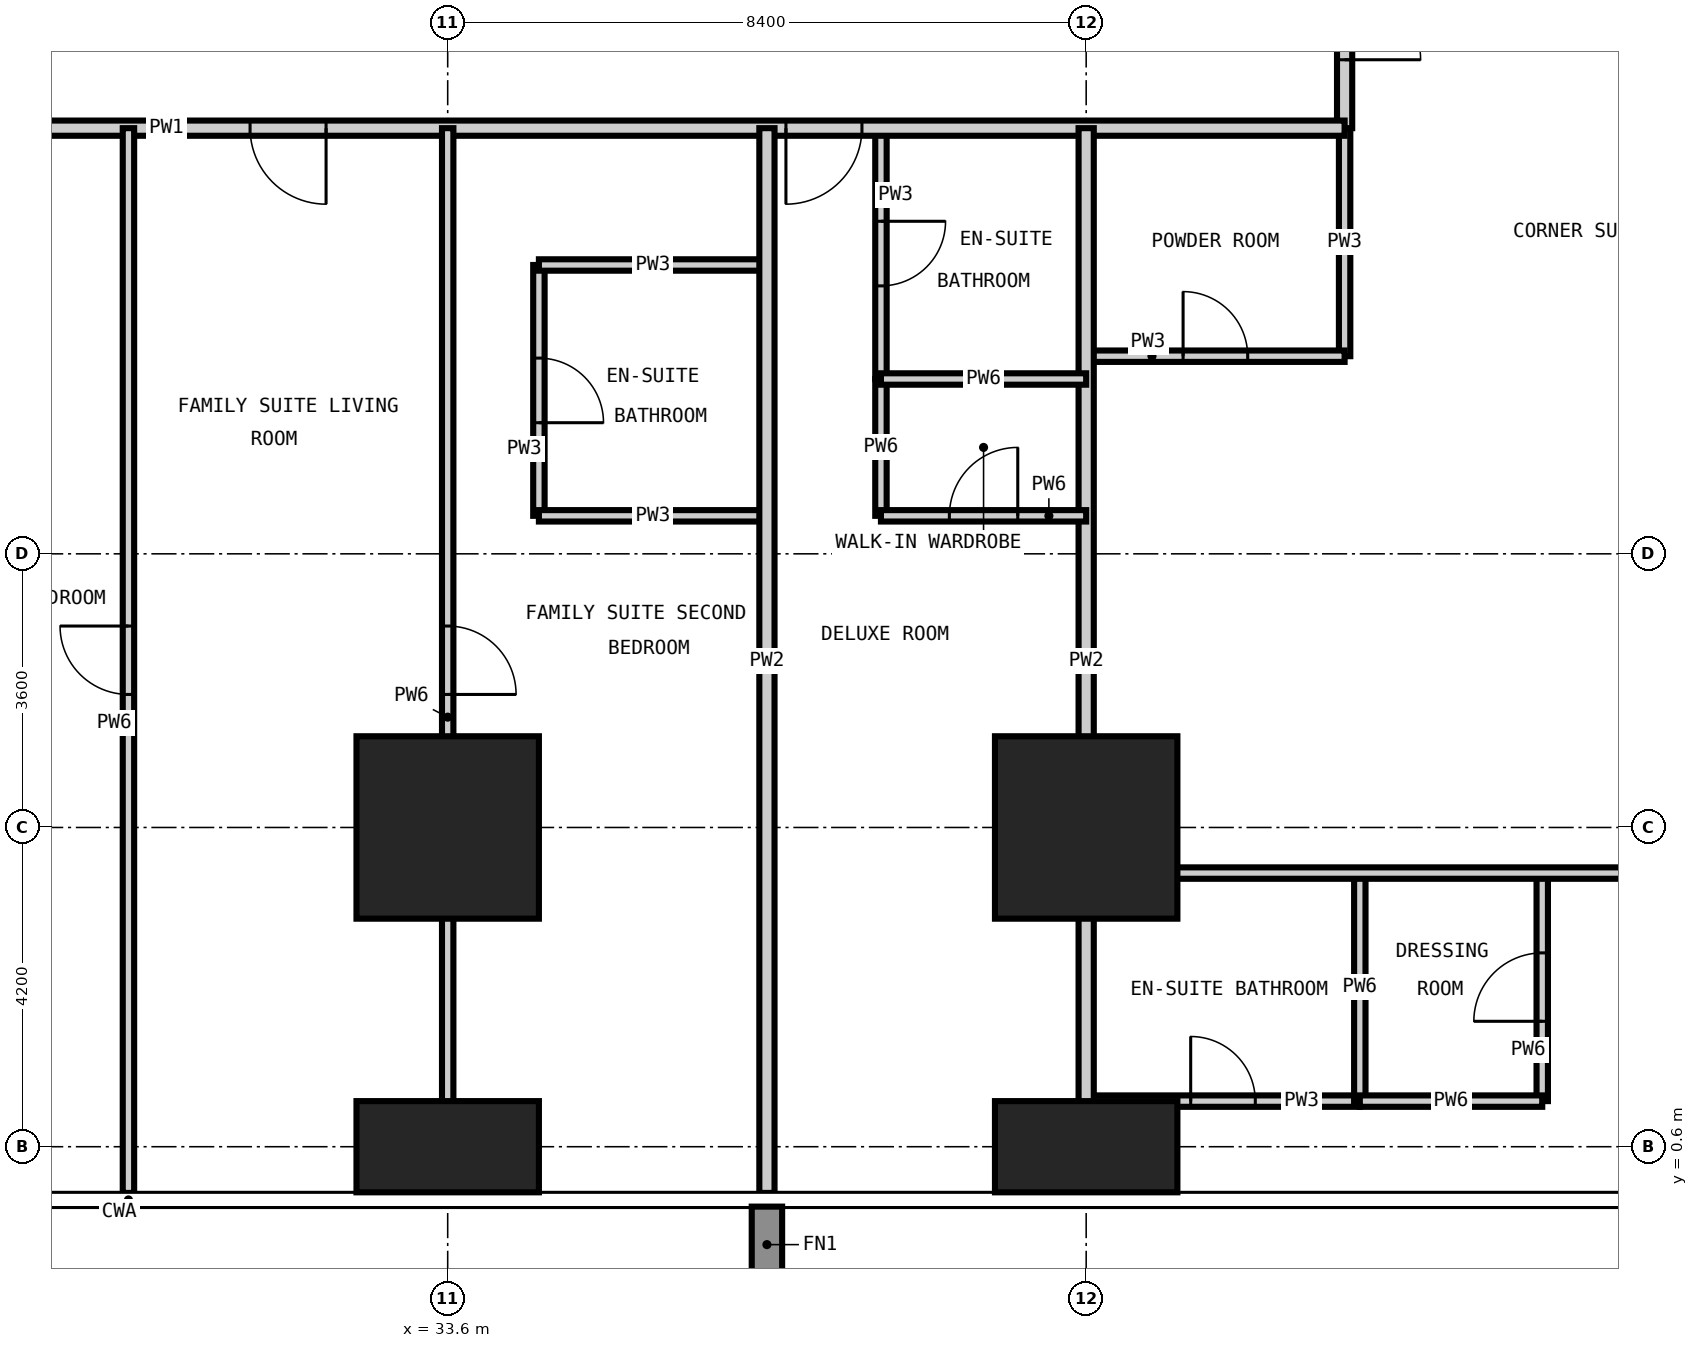
"""IFC4 building model, lengths in metres.
Left out: names, types, materials, properties, quantities, classifications, styles, units other than length and angle.
Written with IfcOpenShell. Run it as: python <this file> out.ifc"""

import sys

from ifc_helpers import new_model, si_unit, direction, frame, frame_2d, origin, origin_2d, place, context, subcontext, project, spatial, rectangle, extrude, element, fill, save


model = new_model("IFC4")
c1 = context("Model", 3, precision=1e-05, world=origin(), true_north=direction((0.0, 1.0)))
c2 = subcontext(c1, "Body", "Model", "MODEL_VIEW")
j1 = project(units=[si_unit("LENGTHUNIT", "METRE"), si_unit("PLANEANGLEUNIT", "RADIAN")], contexts=[c1])
p1 = place(None, origin())
s1 = spatial("IfcSite", under=j1, at=p1, CompositionType="ELEMENT")
p2 = place(p1, origin())
s2 = spatial("IfcBuilding", under=s1, at=p2, CompositionType="ELEMENT")
p3 = place(p2, frame((0.0, 0.0, 81.0)))
s3 = spatial("IfcBuildingStorey", under=s2, at=p3, CompositionType="ELEMENT", Elevation=81.0)
p4 = place(p3, frame((33.6, 0.6, -0.35), z_axis=(0.0, 0.0, 1.0), x_axis=(1.0, 0.0, 0.0)))
e1 = element("IfcColumn", 1, at=p4, inside=s3, PredefinedType="COLUMN", context=c2, shape_type="SweptSolid", body=[
    extrude(rectangle(XDim=2.4, YDim=1.2, at=origin_2d()), origin(), (0.0, 0.0, 1.0), 3.6),
])
p5 = place(p3, frame((33.6, 4.8, -0.35), z_axis=(0.0, 0.0, 1.0), x_axis=(1.0, 0.0, 0.0)))
e2 = element("IfcColumn", 2, at=p5, inside=s3, PredefinedType="COLUMN", context=c2, shape_type="SweptSolid", body=[
    extrude(rectangle(XDim=2.4, YDim=2.4, at=origin_2d()), origin(), (0.0, 0.0, 1.0), 3.6),
])
p6 = place(p3, frame((42.0, 0.6, -0.35), z_axis=(0.0, 0.0, 1.0), x_axis=(1.0, 0.0, 0.0)))
e3 = element("IfcColumn", 3, at=p6, inside=s3, PredefinedType="COLUMN", context=c2, shape_type="SweptSolid", body=[
    extrude(rectangle(XDim=2.4, YDim=1.2, at=origin_2d()), origin(), (0.0, 0.0, 1.0), 3.6),
])
p7 = place(p3, frame((42.0, 4.8, -0.35), z_axis=(0.0, 0.0, 1.0), x_axis=(1.0, 0.0, 0.0)))
e4 = element("IfcColumn", 4, at=p7, inside=s3, PredefinedType="COLUMN", context=c2, shape_type="SweptSolid", body=[
    extrude(rectangle(XDim=2.4, YDim=2.4, at=origin_2d()), origin(), (0.0, 0.0, 1.0), 3.6),
])
p8 = place(p3, frame((34.8, 8.9, 0.0), z_axis=(0.0, 0.0, 1.0), x_axis=(0.0, 1.0, 0.0)))
e5 = element("IfcWall", 5, at=p8, inside=s3, PredefinedType="PARTITIONING", context=c2, shape_type="SweptSolid", body=[
    extrude(rectangle(XDim=3.3, YDim=0.15, at=frame_2d((1.65, 0.0))), origin(), (0.0, 0.0, 1.0), 3.25),
])
p9 = place(p8, frame((1.225, 0.0, 0.0)))
e6 = element("IfcOpeningElement", 6, at=p9, cuts=e5, PredefinedType="OPENING", context=c2, shape_type="SweptSolid", body=[
    extrude(rectangle(XDim=0.85, YDim=2.1, at=frame_2d((0.425, 1.05))), frame((0.0, 0.085, 0.0), z_axis=(0.0, -1.0, 0.0), x_axis=(1.0, 0.0, 0.0)), (0.0, 0.0, 1.0), 0.17),
])
p10 = place(p3, frame((39.3, 10.7, 0.0), z_axis=(0.0, 0.0, 1.0), x_axis=(0.0, 1.0, 0.0)))
e7 = element("IfcWall", 7, at=p10, inside=s3, PredefinedType="PARTITIONING", context=c2, shape_type="SweptSolid", body=[
    extrude(rectangle(XDim=3.3, YDim=0.15, at=frame_2d((1.65, 0.0))), origin(), (0.0, 0.0, 1.0), 3.25),
])
p11 = place(p10, frame((1.225, 0.0, 0.0)))
e8 = element("IfcOpeningElement", 8, at=p11, cuts=e7, PredefinedType="OPENING", context=c2, shape_type="SweptSolid", body=[
    extrude(rectangle(XDim=0.85, YDim=2.1, at=frame_2d((0.425, 1.05))), frame((0.0, 0.085, 0.0), z_axis=(0.0, -1.0, 0.0), x_axis=(1.0, 0.0, 0.0)), (0.0, 0.0, 1.0), 0.17),
])
p12 = place(p3, frame((45.4, 11.0, 0.0), z_axis=(0.0, 0.0, 1.0), x_axis=(0.0, 1.0, 0.0)))
e9 = element("IfcWall", 9, at=p12, inside=s3, PredefinedType="PARTITIONING", context=c2, shape_type="SweptSolid", body=[
    extrude(rectangle(XDim=3.0, YDim=0.15, at=frame_2d((1.5, 0.0))), origin(), (0.0, 0.0, 1.0), 3.25),
])
p13 = place(p3, frame((42.0, 1.2, 0.0), z_axis=(0.0, 0.0, 1.0), x_axis=(1.0, 0.0, 0.0)))
e10 = element("IfcWall", 10, at=p13, inside=s3, PredefinedType="PARTITIONING", context=c2, shape_type="SweptSolid", body=[
    extrude(rectangle(XDim=3.6, YDim=0.15, at=frame_2d((1.8, 0.0))), origin(), (0.0, 0.0, 1.0), 3.25),
])
p14 = place(p13, frame((1.375, 0.0, 0.0)))
e11 = element("IfcOpeningElement", 11, at=p14, cuts=e10, PredefinedType="OPENING", context=c2, shape_type="SweptSolid", body=[
    extrude(rectangle(XDim=0.85, YDim=2.1, at=frame_2d((0.425, 1.05))), frame((0.0, 0.085, 0.0), z_axis=(0.0, -1.0, 0.0), x_axis=(1.0, 0.0, 0.0)), (0.0, 0.0, 1.0), 0.17),
])
p15 = place(p3, frame((34.8, 8.9, 0.0), z_axis=(0.0, 0.0, 1.0), x_axis=(1.0, 0.0, 0.0)))
e12 = element("IfcWall", 12, at=p15, inside=s3, PredefinedType="PARTITIONING", context=c2, shape_type="SweptSolid", body=[
    extrude(rectangle(XDim=3.0, YDim=0.15, at=frame_2d((1.5, 0.0))), origin(), (0.0, 0.0, 1.0), 3.25),
])
p16 = place(p3, frame((42.0, 11.0, 0.0), z_axis=(0.0, 0.0, 1.0), x_axis=(1.0, 0.0, 0.0)))
e13 = element("IfcWall", 13, at=p16, inside=s3, PredefinedType="PARTITIONING", context=c2, shape_type="SweptSolid", body=[
    extrude(rectangle(XDim=3.4, YDim=0.15, at=frame_2d((1.7, 0.0))), origin(), (0.0, 0.0, 1.0), 3.25),
])
p17 = place(p16, frame((1.275, 0.0, 0.0)))
e14 = element("IfcOpeningElement", 14, at=p17, cuts=e13, PredefinedType="OPENING", context=c2, shape_type="SweptSolid", body=[
    extrude(rectangle(XDim=0.85, YDim=2.1, at=frame_2d((0.425, 1.05))), frame((0.0, 0.085, 0.0), z_axis=(0.0, -1.0, 0.0), x_axis=(1.0, 0.0, 0.0)), (0.0, 0.0, 1.0), 0.17),
])
p18 = place(p3, frame((34.8, 12.2, 0.0), z_axis=(0.0, 0.0, 1.0), x_axis=(1.0, 0.0, 0.0)))
e15 = element("IfcWall", 15, at=p18, inside=s3, PredefinedType="PARTITIONING", context=c2, shape_type="SweptSolid", body=[
    extrude(rectangle(XDim=3.0, YDim=0.15, at=frame_2d((1.5, 0.0))), origin(), (0.0, 0.0, 1.0), 3.25),
])
p19 = place(p3, frame((45.4, 46.0, 0.0), z_axis=(0.0, 0.0, 1.0), x_axis=(0.0, -1.0, 0.0)))
e16 = element("IfcWall", 16, at=p19, inside=s3, PredefinedType="PARTITIONING", context=c2, shape_type="SweptSolid", body=[
    extrude(rectangle(XDim=32.0, YDim=0.2, at=frame_2d((16.0, 0.0))), origin(), (0.0, 0.0, 1.0), 3.25),
])
p20 = place(p19, frame((22.4, 0.0, 0.0)))
e17 = element("IfcOpeningElement", 17, at=p20, cuts=e16, PredefinedType="OPENING", context=c2, shape_type="SweptSolid", body=[
    extrude(rectangle(XDim=1.0, YDim=2.2, at=frame_2d((0.5, 1.1))), frame((0.0, 0.11, 0.0), z_axis=(0.0, -1.0, 0.0), x_axis=(1.0, 0.0, 0.0)), (0.0, 0.0, 1.0), 0.22),
])
p21 = place(p19, frame((9.8, 0.0, 0.0)))
e18 = element("IfcOpeningElement", 18, at=p21, cuts=e16, PredefinedType="OPENING", context=c2, shape_type="SweptSolid", body=[
    extrude(rectangle(XDim=1.0, YDim=2.2, at=frame_2d((0.5, 1.1))), frame((0.0, 0.11, 0.0), z_axis=(0.0, -1.0, 0.0), x_axis=(1.0, 0.0, 0.0)), (0.0, 0.0, 1.0), 0.22),
])
p22 = place(p19, frame((30.1, 0.0, 0.0)))
e19 = element("IfcOpeningElement", 19, at=p22, cuts=e16, PredefinedType="OPENING", context=c2, shape_type="SweptSolid", body=[
    extrude(rectangle(XDim=1.0, YDim=2.2, at=frame_2d((0.5, 1.1))), frame((0.0, 0.11, 0.0), z_axis=(0.0, -1.0, 0.0), x_axis=(1.0, 0.0, 0.0)), (0.0, 0.0, 1.0), 0.22),
])
p23 = place(p19, frame((1.5, 0.0, 0.0)))
e20 = element("IfcOpeningElement", 20, at=p23, cuts=e16, PredefinedType="OPENING", context=c2, shape_type="SweptSolid", body=[
    extrude(rectangle(XDim=1.0, YDim=2.2, at=frame_2d((0.5, 1.1))), frame((0.0, 0.11, 0.0), z_axis=(0.0, -1.0, 0.0), x_axis=(1.0, 0.0, 0.0)), (0.0, 0.0, 1.0), 0.22),
])
p24 = place(p3, frame((45.4, 14.0, 0.0), z_axis=(0.0, 0.0, 1.0), x_axis=(-1.0, 0.0, 0.0)))
e21 = element("IfcWall", 21, at=p24, inside=s3, PredefinedType="PARTITIONING", context=c2, shape_type="SweptSolid", body=[
    extrude(rectangle(XDim=31.4, YDim=0.2, at=frame_2d((15.7, 0.0))), origin(), (0.0, 0.0, 1.0), 3.25),
])
p25 = place(p24, frame((24.65, 0.0, 0.0)))
e22 = element("IfcOpeningElement", 22, at=p25, cuts=e21, PredefinedType="OPENING", context=c2, shape_type="SweptSolid", body=[
    extrude(rectangle(XDim=1.0, YDim=2.2, at=frame_2d((0.5, 1.1))), frame((0.0, 0.11, 0.0), z_axis=(0.0, -1.0, 0.0), x_axis=(1.0, 0.0, 0.0)), (0.0, 0.0, 1.0), 0.22),
])
p26 = place(p24, frame((23.15, 0.0, 0.0)))
e23 = element("IfcOpeningElement", 23, at=p26, cuts=e21, PredefinedType="OPENING", context=c2, shape_type="SweptSolid", body=[
    extrude(rectangle(XDim=1.0, YDim=2.2, at=frame_2d((0.5, 1.1))), frame((0.0, 0.11, 0.0), z_axis=(0.0, -1.0, 0.0), x_axis=(1.0, 0.0, 0.0)), (0.0, 0.0, 1.0), 0.22),
])
p27 = place(p24, frame((13.4, 0.0, 0.0)))
e24 = element("IfcOpeningElement", 24, at=p27, cuts=e21, PredefinedType="OPENING", context=c2, shape_type="SweptSolid", body=[
    extrude(rectangle(XDim=1.0, YDim=2.2, at=frame_2d((0.5, 1.1))), frame((0.0, 0.11, 0.0), z_axis=(0.0, -1.0, 0.0), x_axis=(1.0, 0.0, 0.0)), (0.0, 0.0, 1.0), 0.22),
])
p28 = place(p24, frame((6.35, 0.0, 0.0)))
e25 = element("IfcOpeningElement", 25, at=p28, cuts=e21, PredefinedType="OPENING", context=c2, shape_type="SweptSolid", body=[
    extrude(rectangle(XDim=1.0, YDim=2.2, at=frame_2d((0.5, 1.1))), frame((0.0, 0.11, 0.0), z_axis=(0.0, -1.0, 0.0), x_axis=(1.0, 0.0, 0.0)), (0.0, 0.0, 1.0), 0.22),
])
for number, where, z_axis, x_axis in (
    (26, (37.8, -0.008, 0.0), (0.0, 0.0, 1.0), (0.0, 1.0, 0.0)),
    (27, (42.0, -0.008, 0.0), (0.0, 0.0, 1.0), (0.0, 1.0, 0.0)),
):
    element("IfcWall", number, at=place(p3, frame(where, z_axis=z_axis, x_axis=x_axis)), inside=s3, PredefinedType="PARTITIONING", context=c2, shape_type="SweptSolid", body=[
        extrude(rectangle(XDim=14.008, YDim=0.2, at=frame_2d((7.004, 0.0))), origin(), (0.0, 0.0, 1.0), 3.25),
    ])
p29 = place(p3, frame((29.4, -0.008, 0.0), z_axis=(0.0, 0.0, 1.0), x_axis=(0.0, 1.0, 0.0)))
e28 = element("IfcWall", 28, at=p29, inside=s3, PredefinedType="PARTITIONING", context=c2, shape_type="SweptSolid", body=[
    extrude(rectangle(XDim=14.008, YDim=0.15, at=frame_2d((7.004, 0.0))), origin(), (0.0, 0.0, 1.0), 3.25),
])
p30 = place(p29, frame((6.558, 0.0, 0.0)))
e29 = element("IfcOpeningElement", 29, at=p30, cuts=e28, PredefinedType="OPENING", context=c2, shape_type="SweptSolid", body=[
    extrude(rectangle(XDim=0.9, YDim=2.1, at=frame_2d((0.45, 1.05))), frame((0.0, 0.085, 0.0), z_axis=(0.0, -1.0, 0.0), x_axis=(1.0, 0.0, 0.0)), (0.0, 0.0, 1.0), 0.17),
])
p31 = place(p3, frame((33.6, -0.008, 0.0), z_axis=(0.0, 0.0, 1.0), x_axis=(0.0, 1.0, 0.0)))
e30 = element("IfcWall", 30, at=p31, inside=s3, PredefinedType="PARTITIONING", context=c2, shape_type="SweptSolid", body=[
    extrude(rectangle(XDim=14.008, YDim=0.15, at=frame_2d((7.004, 0.0))), origin(), (0.0, 0.0, 1.0), 3.25),
])
p32 = place(p31, frame((6.558, 0.0, 0.0)))
e31 = element("IfcOpeningElement", 31, at=p32, cuts=e30, PredefinedType="OPENING", context=c2, shape_type="SweptSolid", body=[
    extrude(rectangle(XDim=0.9, YDim=2.1, at=frame_2d((0.45, 1.05))), frame((0.0, 0.085, 0.0), z_axis=(0.0, -1.0, 0.0), x_axis=(1.0, 0.0, 0.0)), (0.0, 0.0, 1.0), 0.17),
])
p33 = place(p3, frame((39.3, 8.9, 0.0), z_axis=(0.0, 0.0, 1.0), x_axis=(0.0, 1.0, 0.0)))
e32 = element("IfcWall", 32, at=p33, inside=s3, PredefinedType="PARTITIONING", context=c2, shape_type="SweptSolid", body=[
    extrude(rectangle(XDim=1.8, YDim=0.15, at=frame_2d((0.9, 0.0))), origin(), (0.0, 0.0, 1.0), 3.25),
])
p34 = place(p3, frame((45.6, 1.2, 0.0), z_axis=(0.0, 0.0, 1.0), x_axis=(0.0, 1.0, 0.0)))
e33 = element("IfcWall", 33, at=p34, inside=s3, PredefinedType="PARTITIONING", context=c2, shape_type="SweptSolid", body=[
    extrude(rectangle(XDim=3.0, YDim=0.15, at=frame_2d((1.5, 0.0))), origin(), (0.0, 0.0, 1.0), 3.25),
])
p35 = place(p3, frame((48.0, 1.2, 0.0), z_axis=(0.0, 0.0, 1.0), x_axis=(0.0, 1.0, 0.0)))
e34 = element("IfcWall", 34, at=p35, inside=s3, PredefinedType="PARTITIONING", context=c2, shape_type="SweptSolid", body=[
    extrude(rectangle(XDim=3.0, YDim=0.15, at=frame_2d((1.5, 0.0))), origin(), (0.0, 0.0, 1.0), 3.25),
])
p36 = place(p35, frame((1.05, 0.0, 0.0)))
e35 = element("IfcOpeningElement", 35, at=p36, cuts=e34, PredefinedType="OPENING", context=c2, shape_type="SweptSolid", body=[
    extrude(rectangle(XDim=0.9, YDim=2.1, at=frame_2d((0.45, 1.05))), frame((0.0, 0.085, 0.0), z_axis=(0.0, -1.0, 0.0), x_axis=(1.0, 0.0, 0.0)), (0.0, 0.0, 1.0), 0.17),
])
p37 = place(p3, frame((45.6, 1.2, 0.0), z_axis=(0.0, 0.0, 1.0), x_axis=(1.0, 0.0, 0.0)))
e36 = element("IfcWall", 36, at=p37, inside=s3, PredefinedType="PARTITIONING", context=c2, shape_type="SweptSolid", body=[
    extrude(rectangle(XDim=2.4, YDim=0.15, at=frame_2d((1.2, 0.0))), origin(), (0.0, 0.0, 1.0), 3.25),
])
p38 = place(p3, frame((42.0, 4.2, 0.0), z_axis=(0.0, 0.0, 1.0), x_axis=(1.0, 0.0, 0.0)))
e37 = element("IfcWall", 37, at=p38, inside=s3, PredefinedType="PARTITIONING", context=c2, shape_type="SweptSolid", body=[
    extrude(rectangle(XDim=16.808, YDim=0.15, at=frame_2d((8.404, 0.0))), origin(), (0.0, 0.0, 1.0), 3.25),
])
p39 = place(p38, frame((10.95, 0.0, 0.0)))
e38 = element("IfcOpeningElement", 38, at=p39, cuts=e37, PredefinedType="OPENING", context=c2, shape_type="SweptSolid", body=[
    extrude(rectangle(XDim=0.9, YDim=2.1, at=frame_2d((0.45, 1.05))), frame((0.0, 0.085, 0.0), z_axis=(0.0, -1.0, 0.0), x_axis=(1.0, 0.0, 0.0)), (0.0, 0.0, 1.0), 0.17),
])
p40 = place(p3, frame((39.3, 8.9, 0.0), z_axis=(0.0, 0.0, 1.0), x_axis=(1.0, 0.0, 0.0)))
e39 = element("IfcWall", 39, at=p40, inside=s3, PredefinedType="PARTITIONING", context=c2, shape_type="SweptSolid", body=[
    extrude(rectangle(XDim=2.7, YDim=0.15, at=frame_2d((1.35, 0.0))), origin(), (0.0, 0.0, 1.0), 3.25),
])
p41 = place(p40, frame((0.9, 0.0, 0.0)))
e40 = element("IfcOpeningElement", 40, at=p41, cuts=e39, PredefinedType="OPENING", context=c2, shape_type="SweptSolid", body=[
    extrude(rectangle(XDim=0.9, YDim=2.1, at=frame_2d((0.45, 1.05))), frame((0.0, 0.085, 0.0), z_axis=(0.0, -1.0, 0.0), x_axis=(1.0, 0.0, 0.0)), (0.0, 0.0, 1.0), 0.17),
])
p42 = place(p3, frame((39.3, 10.7, 0.0), z_axis=(0.0, 0.0, 1.0), x_axis=(1.0, 0.0, 0.0)))
e41 = element("IfcWall", 41, at=p42, inside=s3, PredefinedType="PARTITIONING", context=c2, shape_type="SweptSolid", body=[
    extrude(rectangle(XDim=2.7, YDim=0.15, at=frame_2d((1.35, 0.0))), origin(), (0.0, 0.0, 1.0), 3.25),
])
p43 = place(p27, origin())
e42 = element("IfcDoor", 42, at=p43, inside=s3, OperationType="SINGLE_SWING_LEFT", PredefinedType="DOOR", context=c2, shape_type="SweptSolid", body=[
    extrude(rectangle(XDim=1.0, YDim=2.2, at=frame_2d((0.5, 1.1))), frame((0.0, 0.025, 0.0), z_axis=(0.0, -1.0, 0.0), x_axis=(1.0, 0.0, 0.0)), (0.0, 0.0, 1.0), 0.05),
])
fill(e24, e42)
p44 = place(p30, origin())
e43 = element("IfcDoor", 43, at=p44, inside=s3, OperationType="SINGLE_SWING_RIGHT", PredefinedType="DOOR", context=c2, shape_type="SweptSolid", body=[
    extrude(rectangle(XDim=0.9, YDim=2.1, at=frame_2d((0.45, 1.05))), frame((0.0, 0.025, 0.0), z_axis=(0.0, -1.0, 0.0), x_axis=(1.0, 0.0, 0.0)), (0.0, 0.0, 1.0), 0.05),
])
fill(e29, e43)
p45 = place(p32, frame((0.9, 0.0, 0.0), z_axis=(0.0, 0.0, 1.0), x_axis=(-1.0, 0.0, 0.0)))
e44 = element("IfcDoor", 44, at=p45, inside=s3, OperationType="SINGLE_SWING_RIGHT", PredefinedType="DOOR", context=c2, shape_type="SweptSolid", body=[
    extrude(rectangle(XDim=0.9, YDim=2.1, at=frame_2d((0.45, 1.05))), frame((0.0, 0.025, 0.0), z_axis=(0.0, -1.0, 0.0), x_axis=(1.0, 0.0, 0.0)), (0.0, 0.0, 1.0), 0.05),
])
fill(e31, e44)
p46 = place(p9, frame((0.85, 0.0, 0.0), z_axis=(0.0, 0.0, 1.0), x_axis=(-1.0, 0.0, 0.0)))
e45 = element("IfcDoor", 45, at=p46, inside=s3, OperationType="SINGLE_SWING_RIGHT", PredefinedType="DOOR", context=c2, shape_type="SweptSolid", body=[
    extrude(rectangle(XDim=0.85, YDim=2.1, at=frame_2d((0.425, 1.05))), frame((0.0, 0.025, 0.0), z_axis=(0.0, -1.0, 0.0), x_axis=(1.0, 0.0, 0.0)), (0.0, 0.0, 1.0), 0.05),
])
fill(e6, e45)
p47 = place(p28, origin())
e46 = element("IfcDoor", 46, at=p47, inside=s3, OperationType="SINGLE_SWING_RIGHT", PredefinedType="DOOR", context=c2, shape_type="SweptSolid", body=[
    extrude(rectangle(XDim=1.0, YDim=2.2, at=frame_2d((0.5, 1.1))), frame((0.0, 0.025, 0.0), z_axis=(0.0, -1.0, 0.0), x_axis=(1.0, 0.0, 0.0)), (0.0, 0.0, 1.0), 0.05),
])
fill(e25, e46)
p48 = place(p11, frame((0.85, 0.0, 0.0), z_axis=(0.0, 0.0, 1.0), x_axis=(-1.0, 0.0, 0.0)))
e47 = element("IfcDoor", 47, at=p48, inside=s3, OperationType="SINGLE_SWING_LEFT", PredefinedType="DOOR", context=c2, shape_type="SweptSolid", body=[
    extrude(rectangle(XDim=0.85, YDim=2.1, at=frame_2d((0.425, 1.05))), frame((0.0, 0.025, 0.0), z_axis=(0.0, -1.0, 0.0), x_axis=(1.0, 0.0, 0.0)), (0.0, 0.0, 1.0), 0.05),
])
fill(e8, e47)
p49 = place(p41, origin())
e48 = element("IfcDoor", 48, at=p49, inside=s3, OperationType="SINGLE_SWING_RIGHT", PredefinedType="DOOR", context=c2, shape_type="SweptSolid", body=[
    extrude(rectangle(XDim=0.9, YDim=2.1, at=frame_2d((0.45, 1.05))), frame((0.0, 0.025, 0.0), z_axis=(0.0, -1.0, 0.0), x_axis=(1.0, 0.0, 0.0)), (0.0, 0.0, 1.0), 0.05),
])
fill(e40, e48)
p50 = place(p22, origin())
e49 = element("IfcDoor", 49, at=p50, inside=s3, OperationType="SINGLE_SWING_RIGHT", PredefinedType="DOOR", context=c2, shape_type="SweptSolid", body=[
    extrude(rectangle(XDim=1.0, YDim=2.2, at=frame_2d((0.5, 1.1))), frame((0.0, 0.025, 0.0), z_axis=(0.0, -1.0, 0.0), x_axis=(1.0, 0.0, 0.0)), (0.0, 0.0, 1.0), 0.05),
])
fill(e19, e49)
p51 = place(p17, origin())
e50 = element("IfcDoor", 50, at=p51, inside=s3, OperationType="SINGLE_SWING_LEFT", PredefinedType="DOOR", context=c2, shape_type="SweptSolid", body=[
    extrude(rectangle(XDim=0.85, YDim=2.1, at=frame_2d((0.425, 1.05))), frame((0.0, 0.025, 0.0), z_axis=(0.0, -1.0, 0.0), x_axis=(1.0, 0.0, 0.0)), (0.0, 0.0, 1.0), 0.05),
])
fill(e14, e50)
p52 = place(p14, origin())
e51 = element("IfcDoor", 51, at=p52, inside=s3, OperationType="SINGLE_SWING_LEFT", PredefinedType="DOOR", context=c2, shape_type="SweptSolid", body=[
    extrude(rectangle(XDim=0.85, YDim=2.1, at=frame_2d((0.425, 1.05))), frame((0.0, 0.025, 0.0), z_axis=(0.0, -1.0, 0.0), x_axis=(1.0, 0.0, 0.0)), (0.0, 0.0, 1.0), 0.05),
])
fill(e11, e51)
p53 = place(p36, origin())
e52 = element("IfcDoor", 52, at=p53, inside=s3, OperationType="SINGLE_SWING_LEFT", PredefinedType="DOOR", context=c2, shape_type="SweptSolid", body=[
    extrude(rectangle(XDim=0.9, YDim=2.1, at=frame_2d((0.45, 1.05))), frame((0.0, 0.025, 0.0), z_axis=(0.0, -1.0, 0.0), x_axis=(1.0, 0.0, 0.0)), (0.0, 0.0, 1.0), 0.05),
])
fill(e35, e52)
save(model, sys.argv[1])
